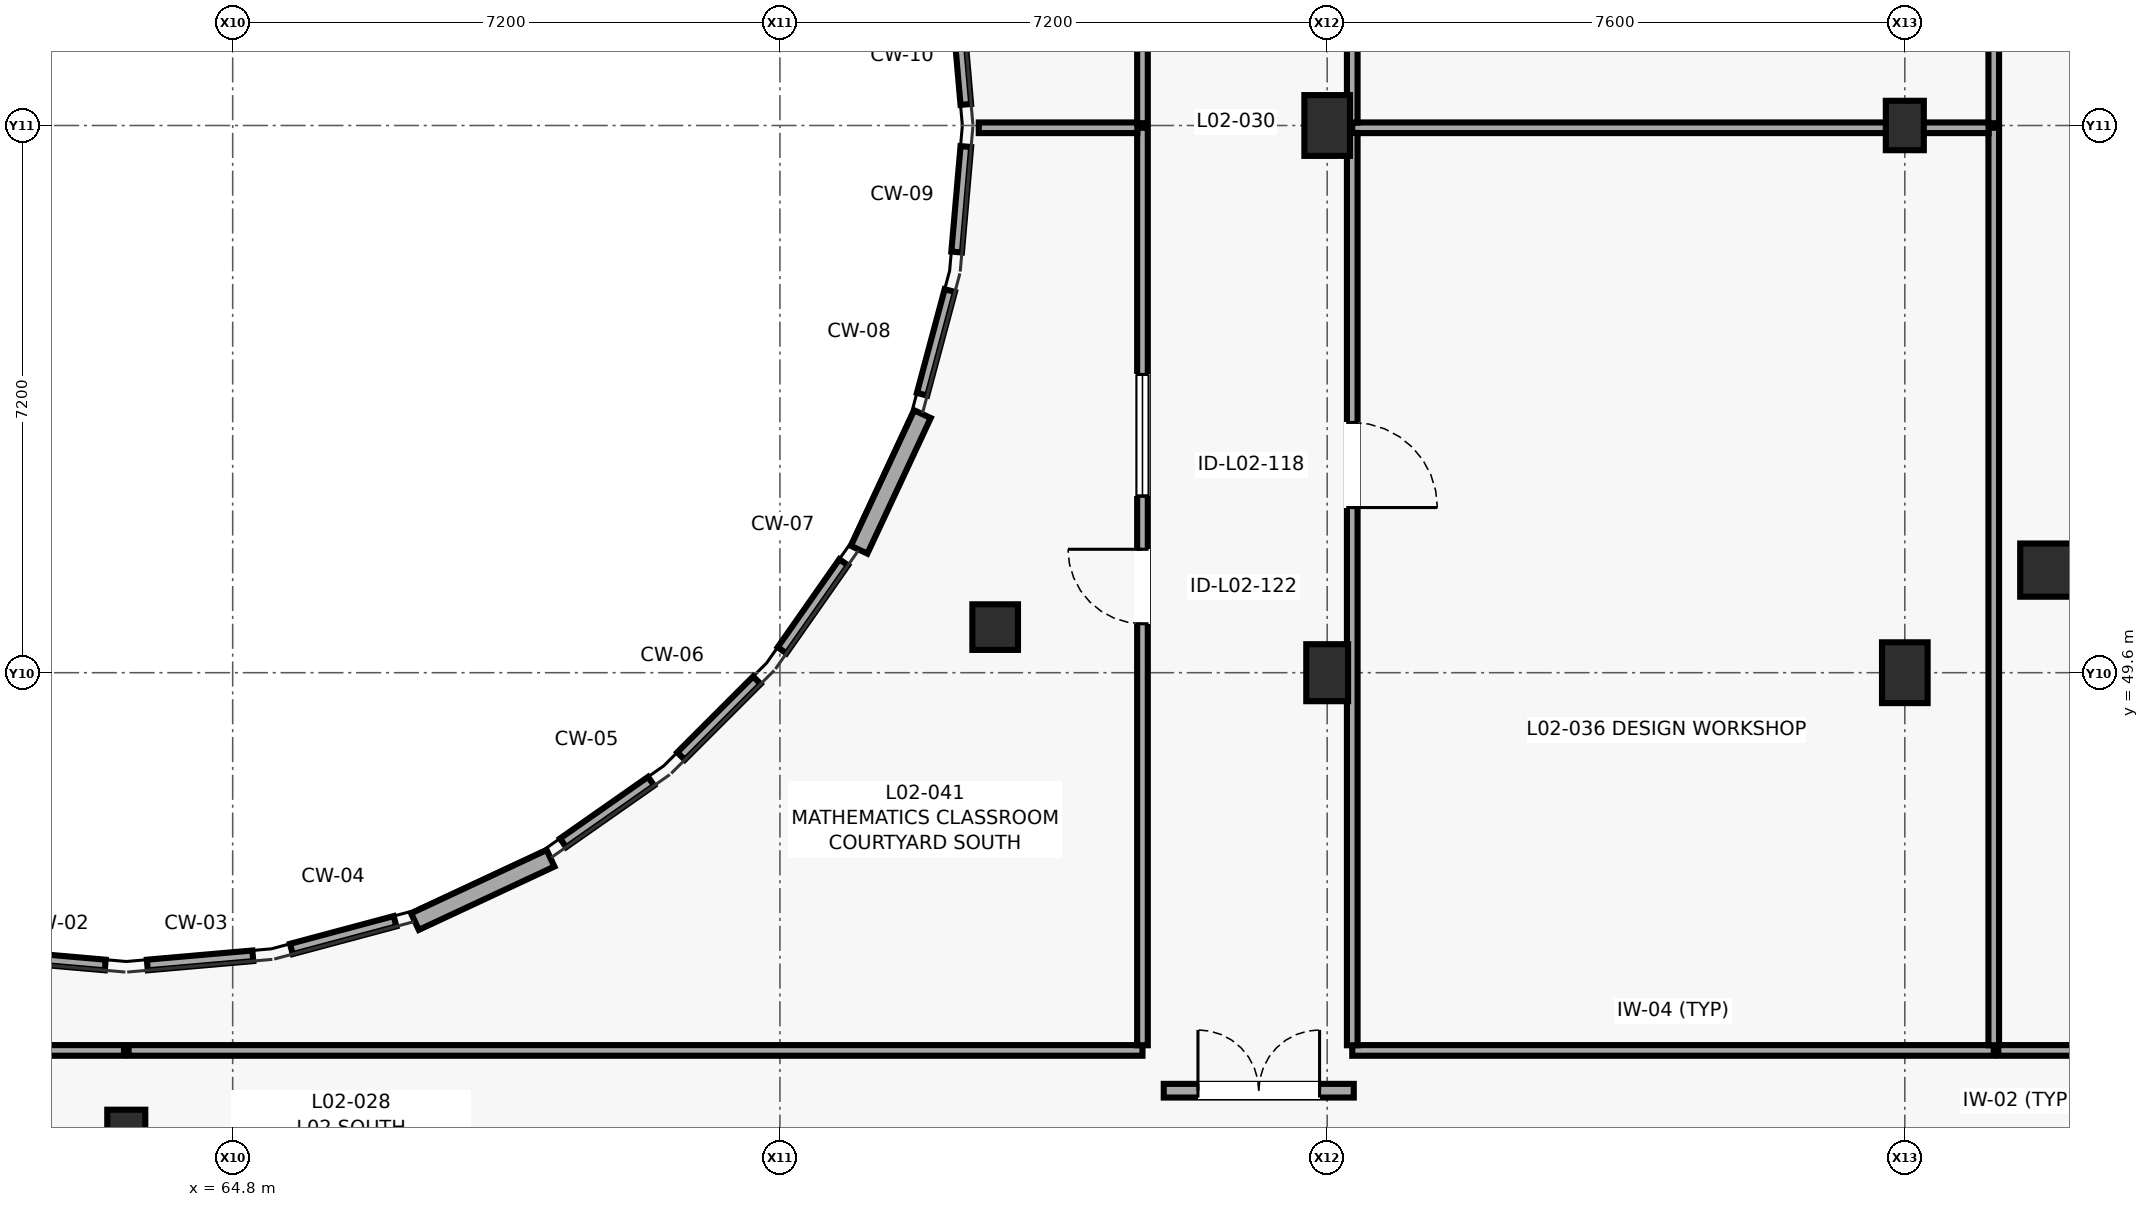
"""IFC4 building model, lengths in metres.
Left out: names, types, materials, properties, quantities, classifications, styles, units other than length and angle.
Written with IfcOpenShell. Run it as: python <this file> out.ifc"""

import sys

from ifc_helpers import new_model, si_unit, direction, frame, frame_2d, origin, origin_2d, place, context, subcontext, project, spatial, rectangle, circle, extrude, element, fill, save


model = new_model("IFC4")
c1 = context("Model", 3, precision=1e-05, world=origin(), true_north=direction((0.0, 1.0)))
c2 = subcontext(c1, "Body", "Model", "MODEL_VIEW")
j1 = project(units=[si_unit("LENGTHUNIT", "METRE"), si_unit("PLANEANGLEUNIT", "RADIAN")], contexts=[c1])
p1 = place(None, origin())
s1 = spatial("IfcSite", under=j1, at=p1, CompositionType="ELEMENT")
p2 = place(p1, origin())
s2 = spatial("IfcBuilding", under=s1, at=p2, CompositionType="ELEMENT")
p3 = place(p2, frame((0.0, 0.0, 8.2)))
s3 = spatial("IfcBuildingStorey", under=s2, at=p3, CompositionType="ELEMENT", Elevation=8.2)
p4 = place(p3, frame((63.4, 43.6, 0.0), z_axis=(0.0, 0.0, 1.0), x_axis=(1.0, 0.0, 0.0)))
e1 = element("IfcColumn", 1, at=p4, inside=s3, PredefinedType="COLUMN", context=c2, shape_type="SweptSolid", body=[
    extrude(circle(Radius=0.25, at=origin_2d()), origin(), (0.0, 0.0, 1.0), 4.0),
])
p5 = place(p3, frame((74.832, 50.2, 0.0), z_axis=(0.0, 0.0, 1.0), x_axis=(1.0, 0.0, 0.0)))
e2 = element("IfcColumn", 2, at=p5, inside=s3, PredefinedType="COLUMN", context=c2, shape_type="SweptSolid", body=[
    extrude(circle(Radius=0.3, at=origin_2d()), origin(), (0.0, 0.0, 1.0), 4.0),
])
p6 = place(p3, frame((79.2, 49.6, 0.0), z_axis=(0.0, 0.0, 1.0), x_axis=(1.0, 0.0, 0.0)))
e3 = element("IfcColumn", 3, at=p6, inside=s3, PredefinedType="COLUMN", context=c2, shape_type="SweptSolid", body=[
    extrude(rectangle(XDim=0.55, YDim=0.75, at=origin_2d()), origin(), (0.0, 0.0, 1.0), 4.0),
])
for number, where, z_axis, x_axis in (
    (4, (79.2, 56.8, 0.0), (0.0, 0.0, 1.0), (1.0, 0.0, 0.0)),
    (5, (86.8, 49.6, 0.0), (0.0, 0.0, 1.0), (1.0, 0.0, 0.0)),
):
    element("IfcColumn", number, at=place(p3, frame(where, z_axis=z_axis, x_axis=x_axis)), inside=s3, PredefinedType="COLUMN", context=c2, shape_type="SweptSolid", body=[
        extrude(rectangle(XDim=0.6, YDim=0.8, at=origin_2d()), origin(), (0.0, 0.0, 1.0), 4.0),
    ])
p7 = place(p3, frame((86.8, 56.8, 0.0), z_axis=(0.0, 0.0, 1.0), x_axis=(1.0, 0.0, 0.0)))
e6 = element("IfcColumn", 6, at=p7, inside=s3, PredefinedType="COLUMN", context=c2, shape_type="SweptSolid", body=[
    extrude(rectangle(XDim=0.5, YDim=0.65, at=origin_2d()), origin(), (0.0, 0.0, 1.0), 4.0),
])
p8 = place(p3, frame((88.668, 50.95, 0.0), z_axis=(0.0, 0.0, 1.0), x_axis=(1.0, 0.0, 0.0)))
e7 = element("IfcColumn", 7, at=p8, inside=s3, PredefinedType="COLUMN", context=c2, shape_type="SweptSolid", body=[
    extrude(circle(Radius=0.35, at=origin_2d()), origin(), (0.0, 0.0, 1.0), 4.0),
])
for number, where, z_axis, x_axis in (
    (8, (67.198, 46.325, 0.0), (0.0, 0.0, 1.0), (0.906, 0.423, 0.0)),
    (9, (73.042, 51.218, 0.0), (0.0, 0.0, 1.0), (0.423, 0.906, 0.0)),
):
    element("IfcWall", number, at=place(p3, frame(where, z_axis=z_axis, x_axis=x_axis)), inside=s3, PredefinedType="SOLIDWALL", context=c2, shape_type="SweptSolid", body=[
        extrude(rectangle(XDim=1.969, YDim=0.24, at=frame_2d((0.984, 0.0))), origin(), (0.0, 0.0, 1.0), 3.78),
    ])
p9 = place(p3, frame((77.05, 44.1, 0.0), z_axis=(0.0, 0.0, 1.0), x_axis=(1.0, 0.0, 0.0)))
e10 = element("IfcWall", 10, at=p9, inside=s3, PredefinedType="PARTITIONING", context=c2, shape_type="SweptSolid", body=[
    extrude(rectangle(XDim=2.5, YDim=0.18, at=frame_2d((1.25, 0.0))), origin(), (0.0, 0.0, 1.0), 3.78),
])
p10 = place(p9, frame((0.45, 0.0, 0.0)))
e11 = element("IfcOpeningElement", 11, at=p10, cuts=e10, PredefinedType="OPENING", context=c2, shape_type="SweptSolid", body=[
    extrude(rectangle(XDim=1.6, YDim=2.25, at=frame_2d((0.8, 1.125))), frame((0.0, 0.1, 0.0), z_axis=(0.0, -1.0, 0.0), x_axis=(1.0, 0.0, 0.0)), (0.0, 0.0, 1.0), 0.2),
])
p11 = place(p3, frame((79.53, 44.63, 0.0), z_axis=(0.0, 0.0, 1.0), x_axis=(1.0, 0.0, 0.0)))
e12 = element("IfcWall", 12, at=p11, inside=s3, PredefinedType="PARTITIONING", context=c2, shape_type="SweptSolid", body=[
    extrude(rectangle(XDim=8.44, YDim=0.14, at=frame_2d((4.22, 0.0))), origin(), (0.0, 0.0, 1.0), 3.775),
])
p12 = place(p3, frame((87.97, 44.698, 0.0), z_axis=(0.0, 0.0, 1.0), x_axis=(0.0, 1.0, 0.0)))
e13 = element("IfcWall", 13, at=p12, inside=s3, PredefinedType="PARTITIONING", context=c2, shape_type="SweptSolid", body=[
    extrude(rectangle(XDim=12.072, YDim=0.14, at=frame_2d((6.036, 0.0))), origin(), (0.0, 0.0, 1.0), 3.775),
])
p13 = place(p3, frame((87.902, 56.77, 0.0), z_axis=(0.0, 0.0, 1.0), x_axis=(-1.0, 0.0, 0.0)))
e14 = element("IfcWall", 14, at=p13, inside=s3, PredefinedType="PARTITIONING", context=c2, shape_type="SweptSolid", body=[
    extrude(rectangle(XDim=8.372, YDim=0.14, at=frame_2d((4.186, 0.0))), origin(), (0.0, 0.0, 1.0), 2.975),
])
p14 = place(p3, frame((79.53, 56.702, 0.0), z_axis=(0.0, 0.0, 1.0), x_axis=(0.0, -1.0, 0.0)))
e15 = element("IfcWall", 15, at=p14, inside=s3, PredefinedType="PARTITIONING", context=c2, shape_type="SweptSolid", body=[
    extrude(rectangle(XDim=12.004, YDim=0.14, at=frame_2d((6.002, 0.0))), origin(), (0.0, 0.0, 1.0), 3.775),
])
p15 = place(p14, frame((3.809, 0.0, 0.0)))
e16 = element("IfcOpeningElement", 16, at=p15, cuts=e15, PredefinedType="OPENING", context=c2, shape_type="SweptSolid", body=[
    extrude(rectangle(XDim=1.12, YDim=2.18, at=frame_2d((0.56, 1.09))), frame((0.0, 0.08, 0.0), z_axis=(0.0, -1.0, 0.0), x_axis=(1.0, 0.0, 0.0)), (0.0, 0.0, 1.0), 0.16),
])
p16 = place(p3, frame((79.53, 69.312, 0.0), z_axis=(0.0, 0.0, 1.0), x_axis=(0.0, -1.0, 0.0)))
e17 = element("IfcWall", 17, at=p16, inside=s3, PredefinedType="PARTITIONING", context=c2, shape_type="SweptSolid", body=[
    extrude(rectangle(XDim=12.474, YDim=0.14, at=frame_2d((6.237, 0.0))), origin(), (0.0, 0.0, 1.0), 3.775),
])
p17 = place(p16, frame((7.445, 0.0, 0.0)))
e18 = element("IfcOpeningElement", 18, at=p17, cuts=e17, PredefinedType="OPENING", context=c2, shape_type="SweptSolid", body=[
    extrude(rectangle(XDim=1.02, YDim=2.14, at=frame_2d((0.51, 1.07))), frame((0.0, 0.08, 0.0), z_axis=(0.0, -1.0, 0.0), x_axis=(1.0, 0.0, 0.0)), (0.0, 0.0, 1.0), 0.16),
])
p18 = place(p16, frame((9.165, 0.0, 1.05)))
e19 = element("IfcOpeningElement", 19, at=p18, cuts=e17, PredefinedType="OPENING", context=c2, shape_type="SweptSolid", body=[
    extrude(rectangle(XDim=1.6, YDim=1.1, at=frame_2d((0.8, 0.55))), frame((0.0, 0.08, 0.0), z_axis=(0.0, -1.0, 0.0), x_axis=(1.0, 0.0, 0.0)), (0.0, 0.0, 1.0), 0.16),
])
p19 = place(p3, frame((87.97, 56.83, 0.0), z_axis=(0.0, 0.0, 1.0), x_axis=(0.0, 1.0, 0.0)))
e20 = element("IfcWall", 20, at=p19, inside=s3, PredefinedType="PARTITIONING", context=c2, shape_type="SweptSolid", body=[
    extrude(rectangle(XDim=12.14, YDim=0.14, at=frame_2d((6.07, 0.0))), origin(), (0.0, 0.0, 1.0), 3.775),
])
p20 = place(p3, frame((51.498, 44.63, 0.0), z_axis=(0.0, 0.0, 1.0), x_axis=(1.0, 0.0, 0.0)))
e21 = element("IfcWall", 21, at=p20, inside=s3, PredefinedType="PARTITIONING", context=c2, shape_type="SweptSolid", body=[
    extrude(rectangle(XDim=11.872, YDim=0.14, at=frame_2d((5.936, 0.0))), origin(), (0.0, 0.0, 1.0), 3.775),
])
p21 = place(p3, frame((63.123, 45.754, 0.0), z_axis=(0.0, 0.0, 1.0), x_axis=(-0.996215560037, 0.086916960031, 0.0)))
e22 = element("IfcWall", 22, at=p21, inside=s3, PredefinedType="PARTITIONING", context=c2, shape_type="SweptSolid", body=[
    extrude(rectangle(XDim=1.393, YDim=0.14, at=frame_2d((0.697, 0.0))), origin(), (0.0, 0.0, 1.0), 3.775),
])
p22 = place(p3, frame((71.697, 49.501, 0.0), z_axis=(0.0, 0.0, 1.0), x_axis=(-0.707106781187, -0.707106781187, 0.0)))
e23 = element("IfcWall", 23, at=p22, inside=s3, PredefinedType="PARTITIONING", context=c2, shape_type="SweptSolid", body=[
    extrude(rectangle(XDim=1.411, YDim=0.14, at=frame_2d((0.706, 0.0))), origin(), (0.0, 0.0, 1.0), 3.775),
])
p23 = place(p3, frame((70.305, 48.172, 0.0), z_axis=(0.0, 0.0, 1.0), x_axis=(-0.819077743108, -0.57368253481, 0.0)))
e24 = element("IfcWall", 24, at=p23, inside=s3, PredefinedType="PARTITIONING", context=c2, shape_type="SweptSolid", body=[
    extrude(rectangle(XDim=1.414, YDim=0.14, at=frame_2d((0.707, 0.0))), origin(), (0.0, 0.0, 1.0), 3.775),
])
p24 = place(p3, frame((66.936, 46.33, 0.0), z_axis=(0.0, 0.0, 1.0), x_axis=(-0.966013611766, -0.258491202719, 0.0)))
e25 = element("IfcWall", 25, at=p24, inside=s3, PredefinedType="PARTITIONING", context=c2, shape_type="SweptSolid", body=[
    extrude(rectangle(XDim=1.412, YDim=0.14, at=frame_2d((0.706, 0.0))), origin(), (0.0, 0.0, 1.0), 3.775),
])
p25 = place(p3, frame((65.065, 45.875, 0.0), z_axis=(0.0, 0.0, 1.0), x_axis=(-0.996215560037, -0.086916960031, 0.0)))
e26 = element("IfcWall", 26, at=p25, inside=s3, PredefinedType="PARTITIONING", context=c2, shape_type="SweptSolid", body=[
    extrude(rectangle(XDim=1.393, YDim=0.14, at=frame_2d((0.697, 0.0))), origin(), (0.0, 0.0, 1.0), 3.775),
])
p26 = place(p3, frame((63.43, 44.63, 0.0), z_axis=(0.0, 0.0, 1.0), x_axis=(1.0, 0.0, 0.0)))
e27 = element("IfcWall", 27, at=p26, inside=s3, PredefinedType="PARTITIONING", context=c2, shape_type="SweptSolid", body=[
    extrude(rectangle(XDim=13.34, YDim=0.14, at=frame_2d((6.67, 0.0))), origin(), (0.0, 0.0, 1.0), 3.775),
])
p27 = place(p3, frame((76.77, 44.698, 0.0), z_axis=(0.0, 0.0, 1.0), x_axis=(0.0, 1.0, 0.0)))
e28 = element("IfcWall", 28, at=p27, inside=s3, PredefinedType="PARTITIONING", context=c2, shape_type="SweptSolid", body=[
    extrude(rectangle(XDim=12.072, YDim=0.14, at=frame_2d((6.036, 0.0))), origin(), (0.0, 0.0, 1.0), 3.775),
])
p28 = place(p27, frame((5.546, 0.0, 0.0)))
e29 = element("IfcOpeningElement", 29, at=p28, cuts=e28, PredefinedType="OPENING", context=c2, shape_type="SweptSolid", body=[
    extrude(rectangle(XDim=0.98, YDim=2.12, at=frame_2d((0.49, 1.06))), frame((0.0, 0.08, 0.0), z_axis=(0.0, -1.0, 0.0), x_axis=(1.0, 0.0, 0.0)), (0.0, 0.0, 1.0), 0.16),
])
p29 = place(p27, frame((7.226, 0.0, 1.05)))
e30 = element("IfcOpeningElement", 30, at=p29, cuts=e28, PredefinedType="OPENING", context=c2, shape_type="SweptSolid", body=[
    extrude(rectangle(XDim=1.6, YDim=1.1, at=frame_2d((0.8, 0.55))), frame((0.0, 0.08, 0.0), z_axis=(0.0, -1.0, 0.0), x_axis=(1.0, 0.0, 0.0)), (0.0, 0.0, 1.0), 0.16),
])
p30 = place(p3, frame((76.702, 56.77, 0.0), z_axis=(0.0, 0.0, 1.0), x_axis=(-1.0, 0.0, 0.0)))
e31 = element("IfcWall", 31, at=p30, inside=s3, PredefinedType="PARTITIONING", context=c2, shape_type="SweptSolid", body=[
    extrude(rectangle(XDim=2.086, YDim=0.14, at=frame_2d((1.043, 0.0))), origin(), (0.0, 0.0, 1.0), 3.775),
])
p31 = place(p3, frame((74.446, 56.523, 0.0), z_axis=(0.0, 0.0, 1.0), x_axis=(-0.086916960031, -0.996215560037, 0.0)))
e32 = element("IfcWall", 32, at=p31, inside=s3, PredefinedType="PARTITIONING", context=c2, shape_type="SweptSolid", body=[
    extrude(rectangle(XDim=1.393, YDim=0.14, at=frame_2d((0.697, 0.0))), origin(), (0.0, 0.0, 1.0), 3.775),
])
p32 = place(p3, frame((74.235, 54.628, 0.0), z_axis=(0.0, 0.0, 1.0), x_axis=(-0.258491202719, -0.966013611766, 0.0)))
e33 = element("IfcWall", 33, at=p32, inside=s3, PredefinedType="PARTITIONING", context=c2, shape_type="SweptSolid", body=[
    extrude(rectangle(XDim=1.412, YDim=0.14, at=frame_2d((0.706, 0.0))), origin(), (0.0, 0.0, 1.0), 3.775),
])
p33 = place(p3, frame((72.839, 51.053, 0.0), z_axis=(0.0, 0.0, 1.0), x_axis=(-0.57368253481, -0.819077743108, 0.0)))
e34 = element("IfcWall", 34, at=p33, inside=s3, PredefinedType="PARTITIONING", context=c2, shape_type="SweptSolid", body=[
    extrude(rectangle(XDim=1.414, YDim=0.14, at=frame_2d((0.707, 0.0))), origin(), (0.0, 0.0, 1.0), 3.775),
])
p34 = place(p3, frame((74.325, 58.465, 0.0), z_axis=(0.0, 0.0, 1.0), x_axis=(0.086901789347, -0.996216883519, 0.0)))
e35 = element("IfcWall", 35, at=p34, inside=s3, PredefinedType="PARTITIONING", context=c2, shape_type="SweptSolid", body=[
    extrude(rectangle(XDim=1.394, YDim=0.14, at=frame_2d((0.697, 0.0))), origin(), (0.0, 0.0, 1.0), 3.775),
])
p35 = place(p3, frame((76.77, 56.83, 0.0), z_axis=(0.0, 0.0, 1.0), x_axis=(0.0, 1.0, 0.0)))
e36 = element("IfcWall", 36, at=p35, inside=s3, PredefinedType="PARTITIONING", context=c2, shape_type="SweptSolid", body=[
    extrude(rectangle(XDim=12.14, YDim=0.14, at=frame_2d((6.07, 0.0))), origin(), (0.0, 0.0, 1.0), 3.775),
])
p36 = place(p3, frame((88.03, 44.63, 0.0), z_axis=(0.0, 0.0, 1.0), x_axis=(1.0, 0.0, 0.0)))
e37 = element("IfcWall", 37, at=p36, inside=s3, PredefinedType="PARTITIONING", context=c2, shape_type="SweptSolid", body=[
    extrude(rectangle(XDim=10.732, YDim=0.14, at=frame_2d((5.366, 0.0))), origin(), (0.0, 0.0, 1.0), 3.775),
])
p37 = place(p36, frame((4.856, 0.0, 0.0)))
e38 = element("IfcOpeningElement", 38, at=p37, cuts=e37, PredefinedType="OPENING", context=c2, shape_type="SweptSolid", body=[
    extrude(rectangle(XDim=1.02, YDim=2.14, at=frame_2d((0.51, 1.07))), frame((0.0, 0.08, 0.0), z_axis=(0.0, -1.0, 0.0), x_axis=(1.0, 0.0, 0.0)), (0.0, 0.0, 1.0), 0.16),
])
p38 = place(p36, frame((6.576, 0.0, 1.05)))
e39 = element("IfcOpeningElement", 39, at=p38, cuts=e37, PredefinedType="OPENING", context=c2, shape_type="SweptSolid", body=[
    extrude(rectangle(XDim=1.8, YDim=1.2, at=frame_2d((0.9, 0.6))), frame((0.0, 0.08, 0.0), z_axis=(0.0, -1.0, 0.0), x_axis=(1.0, 0.0, 0.0)), (0.0, 0.0, 1.0), 0.16),
])
p39 = place(p10, origin())
e40 = element("IfcDoor", 40, at=p39, inside=s3, OperationType="DOUBLE_DOOR_SINGLE_SWING", PredefinedType="DOOR", context=c2, shape_type="SweptSolid", body=[
    extrude(rectangle(XDim=1.6, YDim=2.25, at=frame_2d((0.8, 1.125))), frame((0.0, 0.025, 0.0), z_axis=(0.0, -1.0, 0.0), x_axis=(1.0, 0.0, 0.0)), (0.0, 0.0, 1.0), 0.05),
])
fill(e11, e40)
p40 = place(p15, origin())
e41 = element("IfcDoor", 41, at=p40, inside=s3, OperationType="SINGLE_SWING_RIGHT", PredefinedType="DOOR", context=c2, shape_type="SweptSolid", body=[
    extrude(rectangle(XDim=1.12, YDim=2.18, at=frame_2d((0.56, 1.09))), frame((0.0, 0.025, 0.0), z_axis=(0.0, -1.0, 0.0), x_axis=(1.0, 0.0, 0.0)), (0.0, 0.0, 1.0), 0.05),
])
fill(e16, e41)
p41 = place(p28, origin())
e42 = element("IfcDoor", 42, at=p41, inside=s3, OperationType="SINGLE_SWING_RIGHT", PredefinedType="DOOR", context=c2, shape_type="SweptSolid", body=[
    extrude(rectangle(XDim=0.98, YDim=2.12, at=frame_2d((0.49, 1.06))), frame((0.0, 0.025, 0.0), z_axis=(0.0, -1.0, 0.0), x_axis=(1.0, 0.0, 0.0)), (0.0, 0.0, 1.0), 0.05),
])
fill(e29, e42)
p42 = place(p29, origin())
e43 = element("IfcWindow", 43, at=p42, inside=s3, PartitioningType="SINGLE_PANEL", PredefinedType="WINDOW", context=c2, shape_type="SweptSolid", body=[
    extrude(rectangle(XDim=1.6, YDim=1.1, at=frame_2d((0.8, 0.55))), frame((0.0, 0.03, 0.0), z_axis=(0.0, -1.0, 0.0), x_axis=(1.0, 0.0, 0.0)), (0.0, 0.0, 1.0), 0.06),
])
fill(e30, e43)
save(model, sys.argv[1])
